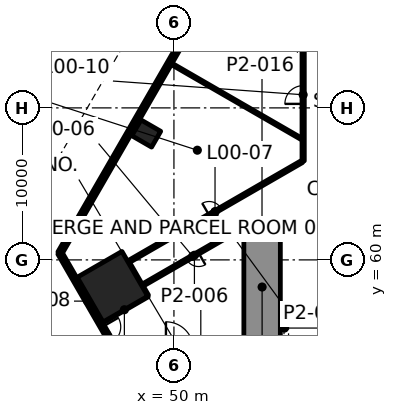
"""IFC4 building model, lengths in metres.
Left out: names, types, materials, properties, quantities, classifications, styles, units other than length and angle.
Written with IfcOpenShell. Run it as: python <this file> out.ifc"""

import sys

from ifc_helpers import new_model, si_unit, direction, frame, frame_2d, origin, origin_2d, place, context, subcontext, project, spatial, rectangle, extrude, element, fill, save


model = new_model("IFC4")
c1 = context("Model", 3, precision=1e-05, world=origin(), true_north=direction((0.0, 1.0)))
c2 = subcontext(c1, "Body", "Model", "MODEL_VIEW")
j1 = project(units=[si_unit("LENGTHUNIT", "METRE"), si_unit("PLANEANGLEUNIT", "RADIAN")], contexts=[c1])
p1 = place(None, origin())
s1 = spatial("IfcSite", under=j1, at=p1, CompositionType="ELEMENT")
p2 = place(p1, origin())
s2 = spatial("IfcBuilding", under=s1, at=p2, CompositionType="ELEMENT")
p3 = place(p2, origin())
s3 = spatial("IfcBuildingStorey", under=s2, at=p3, CompositionType="ELEMENT", Elevation=0.0)
p4 = place(p3, frame((55.8, 54.215, -0.3), z_axis=(0.0, 0.0, 1.0), x_axis=(0.0, 1.0, 0.0)))
e1 = element("IfcWall", 1, at=p4, inside=s3, PredefinedType="SHEAR", context=c2, shape_type="SweptSolid", body=[
    extrude(rectangle(XDim=8.0, YDim=2.4, at=frame_2d((4.0, 0.0))), origin(), (0.0, 0.0, 1.0), 8.3),
])
p5 = place(p3, frame((57.0, 55.515, 2.0), z_axis=(0.0, 0.0, 1.0), x_axis=(1.0, 0.0, 0.0)))
e2 = element("IfcWall", 2, at=p5, inside=s3, PredefinedType="SOLIDWALL", context=c2, shape_type="SweptSolid", body=[
    extrude(rectangle(XDim=0.061, YDim=2.6, at=frame_2d((0.03, 0.0))), origin(), (0.0, 0.0, 1.0), 2.0),
])
p6 = place(p3, frame((57.0, 55.515, 4.0), z_axis=(0.0, 0.0, 1.0), x_axis=(1.0, 0.0, 0.0)))
e3 = element("IfcWall", 3, at=p6, inside=s3, PredefinedType="SOLIDWALL", context=c2, shape_type="SweptSolid", body=[
    extrude(rectangle(XDim=0.24, YDim=2.6, at=frame_2d((0.12, 0.0))), origin(), (0.0, 0.0, 1.0), 2.0),
])
p7 = place(p3, frame((57.0, 55.515, 6.0), z_axis=(0.0, 0.0, 1.0), x_axis=(1.0, 0.0, 0.0)))
e4 = element("IfcWall", 4, at=p7, inside=s3, PredefinedType="SOLIDWALL", context=c2, shape_type="SweptSolid", body=[
    extrude(rectangle(XDim=0.54, YDim=2.6, at=frame_2d((0.27, 0.0))), origin(), (0.0, 0.0, 1.0), 2.0),
])
p8 = place(p3, frame((45.959, 58.233, 0.0), z_axis=(0.0, 0.0, 1.0), x_axis=(0.5, -0.866025403784, 0.0)))
e5 = element("IfcColumn", 5, at=p8, inside=s3, PredefinedType="COLUMN", context=c2, shape_type="SweptSolid", body=[
    extrude(rectangle(XDim=3.4, YDim=3.4, at=origin_2d()), origin(), (0.0, 0.0, 1.0), 8.0),
])
p9 = place(p3, frame((48.179, 68.315, 0.0), z_axis=(0.0, 0.0, 1.0), x_axis=(-0.5, -0.866025403784, 0.0)))
e6 = element("IfcColumn", 6, at=p9, inside=s3, PredefinedType="COLUMN", context=c2, shape_type="SweptSolid", body=[
    extrude(rectangle(XDim=1.2, YDim=1.5, at=origin_2d()), origin(), (0.0, 0.0, 1.0), 8.0),
])
p10 = place(p3, frame((45.198, 55.831, 0.0), z_axis=(0.0, 0.0, 1.0), x_axis=(0.866014251095, 0.500019316528, 0.0)))
e7 = element("IfcWall", 7, at=p10, inside=s3, PredefinedType="PARTITIONING", context=c2, shape_type="SweptSolid", body=[
    extrude(rectangle(XDim=3.559, YDim=0.1, at=frame_2d((1.78, 0.0))), origin(), (0.0, 0.0, 1.0), 7.1),
])
p11 = place(p3, frame((54.814, 62.306, 0.0), z_axis=(0.0, 0.0, 1.0), x_axis=(-0.866017985154, -0.500012849225, 0.0)))
e8 = element("IfcWall", 8, at=p11, inside=s3, PredefinedType="PARTITIONING", context=c2, shape_type="SweptSolid", body=[
    extrude(rectangle(XDim=8.005, YDim=0.15, at=frame_2d((4.002, 0.0))), origin(), (0.0, 0.0, 1.0), 6.947),
])
p12 = place(p11, frame((3.688, 0.0, 0.0)))
e9 = element("IfcOpeningElement", 9, at=p12, cuts=e8, PredefinedType="OPENING", context=c2, shape_type="SweptSolid", body=[
    extrude(rectangle(XDim=0.9, YDim=2.1, at=frame_2d((0.45, 1.05))), frame((0.0, 0.085, 0.0), z_axis=(0.0, -1.0, 0.0), x_axis=(1.0, 0.0, 0.0)), (0.0, 0.0, 1.0), 0.17),
])
p13 = place(p3, frame((46.981, 59.863, 0.0), z_axis=(0.0, 0.0, 1.0), x_axis=(0.866026517173, 0.499998071549, 0.0)))
e10 = element("IfcWall", 10, at=p13, inside=s3, PredefinedType="PARTITIONING", context=c2, shape_type="SweptSolid", body=[
    extrude(rectangle(XDim=13.214, YDim=0.15, at=frame_2d((6.607, 0.0))), origin(), (0.0, 0.0, 1.0), 7.1),
])
p14 = place(p13, frame((6.157, 0.0, 0.0)))
e11 = element("IfcOpeningElement", 11, at=p14, cuts=e10, PredefinedType="OPENING", context=c2, shape_type="SweptSolid", body=[
    extrude(rectangle(XDim=0.9, YDim=2.1, at=frame_2d((0.45, 1.05))), frame((0.0, 0.085, 0.0), z_axis=(0.0, -1.0, 0.0), x_axis=(1.0, 0.0, 0.0)), (0.0, 0.0, 1.0), 0.17),
])
p15 = place(p3, frame((58.5, 66.513, 0.0), z_axis=(0.0, 0.0, 1.0), x_axis=(0.0, 1.0, 0.0)))
e12 = element("IfcWall", 12, at=p15, inside=s3, PredefinedType="PARTITIONING", context=c2, shape_type="SweptSolid", body=[
    extrude(rectangle(XDim=18.177, YDim=0.15, at=frame_2d((9.089, 0.0))), origin(), (0.0, 0.0, 1.0), 7.1),
])
p16 = place(p15, frame((3.75, 0.0, 0.0)))
e13 = element("IfcOpeningElement", 13, at=p16, cuts=e12, PredefinedType="OPENING", context=c2, shape_type="SweptSolid", body=[
    extrude(rectangle(XDim=1.2, YDim=2.1, at=frame_2d((0.6, 1.05))), frame((0.0, 0.085, 0.0), z_axis=(0.0, -1.0, 0.0), x_axis=(1.0, 0.0, 0.0)), (0.0, 0.0, 1.0), 0.17),
])
p17 = place(p15, frame((9.393, 0.0, 0.0)))
e14 = element("IfcOpeningElement", 14, at=p17, cuts=e12, PredefinedType="OPENING", context=c2, shape_type="SweptSolid", body=[
    extrude(rectangle(XDim=1.0, YDim=2.1, at=frame_2d((0.5, 1.05))), frame((0.0, 0.085, 0.0), z_axis=(0.0, -1.0, 0.0), x_axis=(1.0, 0.0, 0.0)), (0.0, 0.0, 1.0), 0.17),
])
p18 = place(p15, frame((14.623, 0.0, 0.0)))
e15 = element("IfcOpeningElement", 15, at=p18, cuts=e12, PredefinedType="OPENING", context=c2, shape_type="SweptSolid", body=[
    extrude(rectangle(XDim=1.2, YDim=2.1, at=frame_2d((0.6, 1.05))), frame((0.0, 0.085, 0.0), z_axis=(0.0, -1.0, 0.0), x_axis=(1.0, 0.0, 0.0)), (0.0, 0.0, 1.0), 0.17),
])
p19 = place(p3, frame((48.256, 57.655, 0.0), z_axis=(0.0, 0.0, 1.0), x_axis=(-0.500108776725, 0.865962592404, 0.0)))
e16 = element("IfcWall", 16, at=p19, inside=s3, PredefinedType="PARTITIONING", context=c2, shape_type="SweptSolid", body=[
    extrude(rectangle(XDim=0.675, YDim=0.15, at=frame_2d((0.337, 0.0))), origin(), (0.0, 0.0, 1.0), 7.1),
])
p20 = place(p3, frame((58.399, 67.957, 0.0), z_axis=(0.0, 0.0, 1.0), x_axis=(-0.866029270811, 0.499993302054, 0.0)))
e17 = element("IfcWall", 17, at=p20, inside=s3, PredefinedType="PARTITIONING", context=c2, shape_type="SweptSolid", body=[
    extrude(rectangle(XDim=9.988, YDim=0.1, at=frame_2d((4.994, 0.0))), origin(), (0.0, 0.0, 1.0), 6.865),
])
p21 = place(p3, frame((47.844, 58.369, 0.0), z_axis=(0.0, 0.0, 1.0), x_axis=(-0.499991515992, 0.866030301974, 0.0)))
e18 = element("IfcWall", 18, at=p21, inside=s3, PredefinedType="PARTITIONING", context=c2, shape_type="SweptSolid", body=[
    extrude(rectangle(XDim=1.649, YDim=0.15, at=frame_2d((0.825, 0.0))), origin(), (0.0, 0.0, 1.0), 6.947),
])
p22 = place(p3, frame((57.0, 62.125, 0.0), z_axis=(0.0, 0.0, 1.0), x_axis=(1.0, 0.0, 0.0)))
e19 = element("IfcWall", 19, at=p22, inside=s3, PredefinedType="SOLIDWALL", context=c2, shape_type="SweptSolid", body=[
    extrude(rectangle(XDim=36.0, YDim=0.3, at=frame_2d((18.0, 0.0))), origin(), (0.0, 0.0, 1.0), 7.7),
])
p23 = place(p22, frame((18.6, 0.0, 0.0)))
e20 = element("IfcOpeningElement", 20, at=p23, cuts=e19, PredefinedType="OPENING", context=c2, shape_type="SweptSolid", body=[
    extrude(rectangle(XDim=2.4, YDim=2.4, at=frame_2d((1.2, 1.2))), frame((0.0, 0.16, 0.0), z_axis=(0.0, -1.0, 0.0), x_axis=(1.0, 0.0, 0.0)), (0.0, 0.0, 1.0), 0.32),
])
p24 = place(p22, frame((15.9, 0.0, 0.0)))
e21 = element("IfcOpeningElement", 21, at=p24, cuts=e19, PredefinedType="OPENING", context=c2, shape_type="SweptSolid", body=[
    extrude(rectangle(XDim=1.0, YDim=2.4, at=frame_2d((0.5, 1.2))), frame((0.0, 0.16, 0.0), z_axis=(0.0, -1.0, 0.0), x_axis=(1.0, 0.0, 0.0)), (0.0, 0.0, 1.0), 0.32),
])
p25 = place(p22, frame((22.7, 0.0, 0.0)))
e22 = element("IfcOpeningElement", 22, at=p25, cuts=e19, PredefinedType="OPENING", context=c2, shape_type="SweptSolid", body=[
    extrude(rectangle(XDim=1.0, YDim=2.4, at=frame_2d((0.5, 1.2))), frame((0.0, 0.16, 0.0), z_axis=(0.0, -1.0, 0.0), x_axis=(1.0, 0.0, 0.0)), (0.0, 0.0, 1.0), 0.32),
])
p26 = place(p3, frame((71.348, 110.424, 0.0), z_axis=(0.0, 0.0, 1.0), x_axis=(-0.500000550228, -0.86602508611, 0.0)))
e23 = element("IfcWall", 23, at=p26, inside=s3, PredefinedType="SOLIDWALL", context=c2, shape_type="SweptSolid", body=[
    extrude(rectangle(XDim=57.704, YDim=0.3, at=frame_2d((28.852, 0.0))), origin(), (0.0, 0.0, 1.0), 7.7),
])
p27 = place(p26, frame((16.711, 0.0, 0.0)))
e24 = element("IfcOpeningElement", 24, at=p27, cuts=e23, PredefinedType="OPENING", context=c2, shape_type="SweptSolid", body=[
    extrude(rectangle(XDim=1.2, YDim=2.4, at=frame_2d((0.6, 1.2))), frame((0.0, 0.16, 0.0), z_axis=(0.0, -1.0, 0.0), x_axis=(1.0, 0.0, 0.0)), (0.0, 0.0, 1.0), 0.32),
])
p28 = place(p26, frame((1.552, 0.0, 0.15)))
e25 = element("IfcOpeningElement", 25, at=p28, cuts=e23, PredefinedType="OPENING", context=c2, shape_type="SweptSolid", body=[
    extrude(rectangle(XDim=2.1, YDim=5.4, at=frame_2d((1.05, 2.7))), frame((0.0, 0.16, 0.0), z_axis=(0.0, -1.0, 0.0), x_axis=(1.0, 0.0, 0.0)), (0.0, 0.0, 1.0), 0.32),
])
p29 = place(p26, frame((4.052, 0.0, 0.15)))
e26 = element("IfcOpeningElement", 26, at=p29, cuts=e23, PredefinedType="OPENING", context=c2, shape_type="SweptSolid", body=[
    extrude(rectangle(XDim=2.1, YDim=5.4, at=frame_2d((1.05, 2.7))), frame((0.0, 0.16, 0.0), z_axis=(0.0, -1.0, 0.0), x_axis=(1.0, 0.0, 0.0)), (0.0, 0.0, 1.0), 0.32),
])
p30 = place(p26, frame((6.552, 0.0, 0.15)))
e27 = element("IfcOpeningElement", 27, at=p30, cuts=e23, PredefinedType="OPENING", context=c2, shape_type="SweptSolid", body=[
    extrude(rectangle(XDim=2.1, YDim=5.4, at=frame_2d((1.05, 2.7))), frame((0.0, 0.16, 0.0), z_axis=(0.0, -1.0, 0.0), x_axis=(1.0, 0.0, 0.0)), (0.0, 0.0, 1.0), 0.32),
])
p31 = place(p26, frame((9.052, 0.0, 0.15)))
e28 = element("IfcOpeningElement", 28, at=p31, cuts=e23, PredefinedType="OPENING", context=c2, shape_type="SweptSolid", body=[
    extrude(rectangle(XDim=2.1, YDim=5.4, at=frame_2d((1.05, 2.7))), frame((0.0, 0.16, 0.0), z_axis=(0.0, -1.0, 0.0), x_axis=(1.0, 0.0, 0.0)), (0.0, 0.0, 1.0), 0.32),
])
p32 = place(p26, frame((11.552, 0.0, 0.15)))
e29 = element("IfcOpeningElement", 29, at=p32, cuts=e23, PredefinedType="OPENING", context=c2, shape_type="SweptSolid", body=[
    extrude(rectangle(XDim=2.1, YDim=5.4, at=frame_2d((1.05, 2.7))), frame((0.0, 0.16, 0.0), z_axis=(0.0, -1.0, 0.0), x_axis=(1.0, 0.0, 0.0)), (0.0, 0.0, 1.0), 0.32),
])
p33 = place(p26, frame((14.052, 0.0, 0.15)))
e30 = element("IfcOpeningElement", 30, at=p33, cuts=e23, PredefinedType="OPENING", context=c2, shape_type="SweptSolid", body=[
    extrude(rectangle(XDim=2.1, YDim=5.4, at=frame_2d((1.05, 2.7))), frame((0.0, 0.16, 0.0), z_axis=(0.0, -1.0, 0.0), x_axis=(1.0, 0.0, 0.0)), (0.0, 0.0, 1.0), 0.32),
])
p34 = place(p26, frame((19.052, 0.0, 0.15)))
e31 = element("IfcOpeningElement", 31, at=p34, cuts=e23, PredefinedType="OPENING", context=c2, shape_type="SweptSolid", body=[
    extrude(rectangle(XDim=2.1, YDim=5.4, at=frame_2d((1.05, 2.7))), frame((0.0, 0.16, 0.0), z_axis=(0.0, -1.0, 0.0), x_axis=(1.0, 0.0, 0.0)), (0.0, 0.0, 1.0), 0.32),
])
p35 = place(p26, frame((21.552, 0.0, 0.15)))
e32 = element("IfcOpeningElement", 32, at=p35, cuts=e23, PredefinedType="OPENING", context=c2, shape_type="SweptSolid", body=[
    extrude(rectangle(XDim=2.1, YDim=5.4, at=frame_2d((1.05, 2.7))), frame((0.0, 0.16, 0.0), z_axis=(0.0, -1.0, 0.0), x_axis=(1.0, 0.0, 0.0)), (0.0, 0.0, 1.0), 0.32),
])
p36 = place(p26, frame((24.052, 0.0, 0.15)))
e33 = element("IfcOpeningElement", 33, at=p36, cuts=e23, PredefinedType="OPENING", context=c2, shape_type="SweptSolid", body=[
    extrude(rectangle(XDim=2.1, YDim=5.4, at=frame_2d((1.05, 2.7))), frame((0.0, 0.16, 0.0), z_axis=(0.0, -1.0, 0.0), x_axis=(1.0, 0.0, 0.0)), (0.0, 0.0, 1.0), 0.32),
])
p37 = place(p26, frame((26.552, 0.0, 0.15)))
e34 = element("IfcOpeningElement", 34, at=p37, cuts=e23, PredefinedType="OPENING", context=c2, shape_type="SweptSolid", body=[
    extrude(rectangle(XDim=2.1, YDim=5.4, at=frame_2d((1.05, 2.7))), frame((0.0, 0.16, 0.0), z_axis=(0.0, -1.0, 0.0), x_axis=(1.0, 0.0, 0.0)), (0.0, 0.0, 1.0), 0.32),
])
p38 = place(p26, frame((29.052, 0.0, 0.15)))
e35 = element("IfcOpeningElement", 35, at=p38, cuts=e23, PredefinedType="OPENING", context=c2, shape_type="SweptSolid", body=[
    extrude(rectangle(XDim=2.1, YDim=5.4, at=frame_2d((1.05, 2.7))), frame((0.0, 0.16, 0.0), z_axis=(0.0, -1.0, 0.0), x_axis=(1.0, 0.0, 0.0)), (0.0, 0.0, 1.0), 0.32),
])
p39 = place(p26, frame((31.552, 0.0, 0.15)))
e36 = element("IfcOpeningElement", 36, at=p39, cuts=e23, PredefinedType="OPENING", context=c2, shape_type="SweptSolid", body=[
    extrude(rectangle(XDim=2.1, YDim=5.4, at=frame_2d((1.05, 2.7))), frame((0.0, 0.16, 0.0), z_axis=(0.0, -1.0, 0.0), x_axis=(1.0, 0.0, 0.0)), (0.0, 0.0, 1.0), 0.32),
])
p40 = place(p26, frame((34.052, 0.0, 0.15)))
e37 = element("IfcOpeningElement", 37, at=p40, cuts=e23, PredefinedType="OPENING", context=c2, shape_type="SweptSolid", body=[
    extrude(rectangle(XDim=2.1, YDim=5.4, at=frame_2d((1.05, 2.7))), frame((0.0, 0.16, 0.0), z_axis=(0.0, -1.0, 0.0), x_axis=(1.0, 0.0, 0.0)), (0.0, 0.0, 1.0), 0.32),
])
p41 = place(p26, frame((36.552, 0.0, 0.15)))
e38 = element("IfcOpeningElement", 38, at=p41, cuts=e23, PredefinedType="OPENING", context=c2, shape_type="SweptSolid", body=[
    extrude(rectangle(XDim=2.1, YDim=5.4, at=frame_2d((1.05, 2.7))), frame((0.0, 0.16, 0.0), z_axis=(0.0, -1.0, 0.0), x_axis=(1.0, 0.0, 0.0)), (0.0, 0.0, 1.0), 0.32),
])
p42 = place(p26, frame((39.052, 0.0, 0.15)))
e39 = element("IfcOpeningElement", 39, at=p42, cuts=e23, PredefinedType="OPENING", context=c2, shape_type="SweptSolid", body=[
    extrude(rectangle(XDim=2.1, YDim=5.4, at=frame_2d((1.05, 2.7))), frame((0.0, 0.16, 0.0), z_axis=(0.0, -1.0, 0.0), x_axis=(1.0, 0.0, 0.0)), (0.0, 0.0, 1.0), 0.32),
])
p43 = place(p26, frame((41.552, 0.0, 0.15)))
e40 = element("IfcOpeningElement", 40, at=p43, cuts=e23, PredefinedType="OPENING", context=c2, shape_type="SweptSolid", body=[
    extrude(rectangle(XDim=2.1, YDim=5.4, at=frame_2d((1.05, 2.7))), frame((0.0, 0.16, 0.0), z_axis=(0.0, -1.0, 0.0), x_axis=(1.0, 0.0, 0.0)), (0.0, 0.0, 1.0), 0.32),
])
p44 = place(p26, frame((44.052, 0.0, 0.15)))
e41 = element("IfcOpeningElement", 41, at=p44, cuts=e23, PredefinedType="OPENING", context=c2, shape_type="SweptSolid", body=[
    extrude(rectangle(XDim=2.1, YDim=5.4, at=frame_2d((1.05, 2.7))), frame((0.0, 0.16, 0.0), z_axis=(0.0, -1.0, 0.0), x_axis=(1.0, 0.0, 0.0)), (0.0, 0.0, 1.0), 0.32),
])
p45 = place(p26, frame((46.552, 0.0, 0.15)))
e42 = element("IfcOpeningElement", 42, at=p45, cuts=e23, PredefinedType="OPENING", context=c2, shape_type="SweptSolid", body=[
    extrude(rectangle(XDim=2.1, YDim=5.4, at=frame_2d((1.05, 2.7))), frame((0.0, 0.16, 0.0), z_axis=(0.0, -1.0, 0.0), x_axis=(1.0, 0.0, 0.0)), (0.0, 0.0, 1.0), 0.32),
])
p46 = place(p26, frame((49.052, 0.0, 0.15)))
e43 = element("IfcOpeningElement", 43, at=p46, cuts=e23, PredefinedType="OPENING", context=c2, shape_type="SweptSolid", body=[
    extrude(rectangle(XDim=2.1, YDim=5.4, at=frame_2d((1.05, 2.7))), frame((0.0, 0.16, 0.0), z_axis=(0.0, -1.0, 0.0), x_axis=(1.0, 0.0, 0.0)), (0.0, 0.0, 1.0), 0.32),
])
p47 = place(p26, frame((51.552, 0.0, 0.15)))
e44 = element("IfcOpeningElement", 44, at=p47, cuts=e23, PredefinedType="OPENING", context=c2, shape_type="SweptSolid", body=[
    extrude(rectangle(XDim=2.1, YDim=5.4, at=frame_2d((1.05, 2.7))), frame((0.0, 0.16, 0.0), z_axis=(0.0, -1.0, 0.0), x_axis=(1.0, 0.0, 0.0)), (0.0, 0.0, 1.0), 0.32),
])
p48 = place(p26, frame((54.052, 0.0, 0.15)))
e45 = element("IfcOpeningElement", 45, at=p48, cuts=e23, PredefinedType="OPENING", context=c2, shape_type="SweptSolid", body=[
    extrude(rectangle(XDim=2.1, YDim=5.4, at=frame_2d((1.05, 2.7))), frame((0.0, 0.16, 0.0), z_axis=(0.0, -1.0, 0.0), x_axis=(1.0, 0.0, 0.0)), (0.0, 0.0, 1.0), 0.32),
])
p49 = place(p3, frame((42.496, 60.451, 0.0), z_axis=(0.0, 0.0, 1.0), x_axis=(0.500000231294, -0.866025270247, 0.0)))
e46 = element("IfcWall", 46, at=p49, inside=s3, PredefinedType="SOLIDWALL", context=c2, shape_type="SweptSolid", body=[
    extrude(rectangle(XDim=7.304, YDim=0.3, at=frame_2d((3.652, 0.0))), origin(), (0.0, 0.0, 1.0), 7.7),
])
p50 = place(p49, frame((5.608, 0.0, 0.0)))
e47 = element("IfcOpeningElement", 47, at=p50, cuts=e46, PredefinedType="OPENING", context=c2, shape_type="SweptSolid", body=[
    extrude(rectangle(XDim=1.2, YDim=2.4, at=frame_2d((0.6, 1.2))), frame((0.0, 0.16, 0.0), z_axis=(0.0, -1.0, 0.0), x_axis=(1.0, 0.0, 0.0)), (0.0, 0.0, 1.0), 0.32),
])
p51 = place(p49, frame((1.352, 0.0, 0.15)))
e48 = element("IfcOpeningElement", 48, at=p51, cuts=e46, PredefinedType="OPENING", context=c2, shape_type="SweptSolid", body=[
    extrude(rectangle(XDim=2.1, YDim=5.4, at=frame_2d((1.05, 2.7))), frame((0.0, 0.16, 0.0), z_axis=(0.0, -1.0, 0.0), x_axis=(1.0, 0.0, 0.0)), (0.0, 0.0, 1.0), 0.32),
])
p52 = place(p12, origin())
e49 = element("IfcDoor", 49, at=p52, inside=s3, OperationType="SINGLE_SWING_RIGHT", PredefinedType="DOOR", context=c2, shape_type="SweptSolid", body=[
    extrude(rectangle(XDim=0.9, YDim=2.1, at=frame_2d((0.45, 1.05))), frame((0.0, 0.025, 0.0), z_axis=(0.0, -1.0, 0.0), x_axis=(1.0, 0.0, 0.0)), (0.0, 0.0, 1.0), 0.05),
])
fill(e9, e49)
p53 = place(p14, origin())
e50 = element("IfcDoor", 50, at=p53, inside=s3, OperationType="SINGLE_SWING_RIGHT", PredefinedType="DOOR", context=c2, shape_type="SweptSolid", body=[
    extrude(rectangle(XDim=0.9, YDim=2.1, at=frame_2d((0.45, 1.05))), frame((0.0, 0.025, 0.0), z_axis=(0.0, -1.0, 0.0), x_axis=(1.0, 0.0, 0.0)), (0.0, 0.0, 1.0), 0.05),
])
fill(e11, e50)
p54 = place(p16, origin())
e51 = element("IfcDoor", 51, at=p54, inside=s3, OperationType="DOUBLE_DOOR_SINGLE_SWING", PredefinedType="DOOR", context=c2, shape_type="SweptSolid", body=[
    extrude(rectangle(XDim=1.2, YDim=2.1, at=frame_2d((0.6, 1.05))), frame((0.0, 0.025, 0.0), z_axis=(0.0, -1.0, 0.0), x_axis=(1.0, 0.0, 0.0)), (0.0, 0.0, 1.0), 0.05),
])
fill(e13, e51)
p55 = place(p43, origin())
e52 = element("IfcWindow", 52, at=p55, inside=s3, PartitioningType="SINGLE_PANEL", PredefinedType="WINDOW", context=c2, shape_type="SweptSolid", body=[
    extrude(rectangle(XDim=2.1, YDim=5.4, at=frame_2d((1.05, 2.7))), frame((0.0, 0.03, 0.0), z_axis=(0.0, -1.0, 0.0), x_axis=(1.0, 0.0, 0.0)), (0.0, 0.0, 1.0), 0.06),
])
fill(e40, e52)
p56 = place(p44, origin())
e53 = element("IfcWindow", 53, at=p56, inside=s3, PartitioningType="SINGLE_PANEL", PredefinedType="WINDOW", context=c2, shape_type="SweptSolid", body=[
    extrude(rectangle(XDim=2.1, YDim=5.4, at=frame_2d((1.05, 2.7))), frame((0.0, 0.03, 0.0), z_axis=(0.0, -1.0, 0.0), x_axis=(1.0, 0.0, 0.0)), (0.0, 0.0, 1.0), 0.06),
])
fill(e41, e53)
p57 = place(p45, origin())
e54 = element("IfcWindow", 54, at=p57, inside=s3, PartitioningType="SINGLE_PANEL", PredefinedType="WINDOW", context=c2, shape_type="SweptSolid", body=[
    extrude(rectangle(XDim=2.1, YDim=5.4, at=frame_2d((1.05, 2.7))), frame((0.0, 0.03, 0.0), z_axis=(0.0, -1.0, 0.0), x_axis=(1.0, 0.0, 0.0)), (0.0, 0.0, 1.0), 0.06),
])
fill(e42, e54)
p58 = place(p46, origin())
e55 = element("IfcWindow", 55, at=p58, inside=s3, PartitioningType="SINGLE_PANEL", PredefinedType="WINDOW", context=c2, shape_type="SweptSolid", body=[
    extrude(rectangle(XDim=2.1, YDim=5.4, at=frame_2d((1.05, 2.7))), frame((0.0, 0.03, 0.0), z_axis=(0.0, -1.0, 0.0), x_axis=(1.0, 0.0, 0.0)), (0.0, 0.0, 1.0), 0.06),
])
fill(e43, e55)
p59 = place(p47, origin())
e56 = element("IfcWindow", 56, at=p59, inside=s3, PartitioningType="SINGLE_PANEL", PredefinedType="WINDOW", context=c2, shape_type="SweptSolid", body=[
    extrude(rectangle(XDim=2.1, YDim=5.4, at=frame_2d((1.05, 2.7))), frame((0.0, 0.03, 0.0), z_axis=(0.0, -1.0, 0.0), x_axis=(1.0, 0.0, 0.0)), (0.0, 0.0, 1.0), 0.06),
])
fill(e44, e56)
p60 = place(p48, origin())
e57 = element("IfcWindow", 57, at=p60, inside=s3, PartitioningType="SINGLE_PANEL", PredefinedType="WINDOW", context=c2, shape_type="SweptSolid", body=[
    extrude(rectangle(XDim=2.1, YDim=5.4, at=frame_2d((1.05, 2.7))), frame((0.0, 0.03, 0.0), z_axis=(0.0, -1.0, 0.0), x_axis=(1.0, 0.0, 0.0)), (0.0, 0.0, 1.0), 0.06),
])
fill(e45, e57)
p61 = place(p50, origin())
e58 = element("IfcDoor", 58, at=p61, inside=s3, OperationType="SINGLE_SWING_RIGHT", PredefinedType="DOOR", context=c2, shape_type="SweptSolid", body=[
    extrude(rectangle(XDim=1.2, YDim=2.4, at=frame_2d((0.6, 1.2))), frame((0.0, 0.025, 0.0), z_axis=(0.0, -1.0, 0.0), x_axis=(1.0, 0.0, 0.0)), (0.0, 0.0, 1.0), 0.05),
])
fill(e47, e58)
p62 = place(p51, origin())
e59 = element("IfcWindow", 59, at=p62, inside=s3, PartitioningType="SINGLE_PANEL", PredefinedType="WINDOW", context=c2, shape_type="SweptSolid", body=[
    extrude(rectangle(XDim=2.1, YDim=5.4, at=frame_2d((1.05, 2.7))), frame((0.0, 0.03, 0.0), z_axis=(0.0, -1.0, 0.0), x_axis=(1.0, 0.0, 0.0)), (0.0, 0.0, 1.0), 0.06),
])
fill(e48, e59)
save(model, sys.argv[1])
